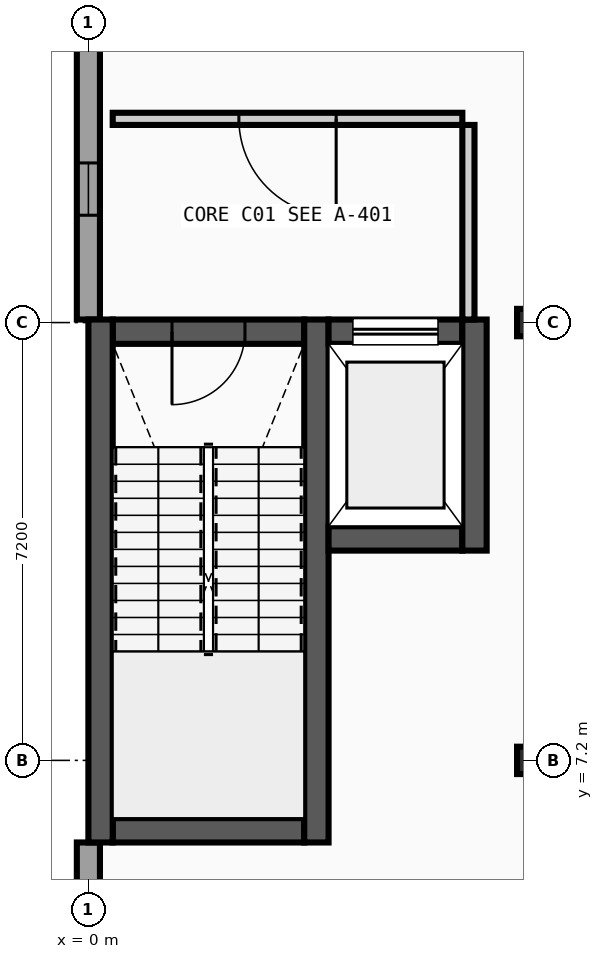
"""IFC4 building model, lengths in metres.
Left out: names, types, materials, properties, quantities, classifications, styles, units other than length and angle.
Written with IfcOpenShell. Run it as: python <this file> out.ifc"""

import sys

from ifc_helpers import new_model, si_unit, direction, frame, frame_2d, origin, origin_2d, place, context, subcontext, project, spatial, rectangle, i_section, extrude, element, fill, save


model = new_model("IFC4")
c1 = context("Model", 3, precision=1e-05, world=origin(), true_north=direction((0.0, 1.0)))
c2 = subcontext(c1, "Body", "Model", "MODEL_VIEW")
j1 = project(units=[si_unit("LENGTHUNIT", "METRE"), si_unit("PLANEANGLEUNIT", "RADIAN")], contexts=[c1])
p1 = place(None, origin())
s1 = spatial("IfcSite", under=j1, at=p1, CompositionType="ELEMENT")
p2 = place(p1, origin())
s2 = spatial("IfcBuilding", under=s1, at=p2, CompositionType="ELEMENT")
p3 = place(p2, frame((0.0, 0.0, 9.6)))
s3 = spatial("IfcBuildingStorey", under=s2, at=p3, CompositionType="ELEMENT", Elevation=9.6)
for number, where, z_axis, x_axis in (
    (1, (7.2, 7.2, 0.0), (0.0, 0.0, 1.0), (1.0, 0.0, 0.0)),
    (2, (7.2, 14.4, 0.0), (0.0, 0.0, 1.0), (1.0, 0.0, 0.0)),
):
    element("IfcColumn", number, at=place(p3, frame(where, z_axis=z_axis, x_axis=x_axis)), inside=s3, PredefinedType="COLUMN", context=c2, shape_type="SweptSolid", body=[
        extrude(i_section(OverallWidth=0.3, OverallDepth=0.45, WebThickness=0.014, FlangeThickness=0.026, FilletRadius=0.027, at=origin_2d()), origin(), (0.0, 0.0, 1.0), 4.4),
    ])
p4 = place(p3, frame((0.0, 5.85, 0.0), z_axis=(0.0, 0.0, 1.0), x_axis=(0.0, -1.0, 0.0)))
e3 = element("IfcWall", 3, at=p4, inside=s3, PredefinedType="STANDARD", context=c2, shape_type="SweptSolid", body=[
    extrude(rectangle(XDim=5.66, YDim=0.38, at=frame_2d((2.83, 0.0))), origin(), (0.0, 0.0, 1.0), 4.2),
])
p5 = place(p4, frame((2.196, 0.0, 0.95)))
e4 = element("IfcOpeningElement", 4, at=p5, cuts=e3, PredefinedType="OPENING", context=c2, shape_type="SweptSolid", body=[
    extrude(rectangle(XDim=1.268, YDim=1.296, at=frame_2d((0.634, 0.648))), frame((0.0, 0.2, 0.0), z_axis=(0.0, -1.0, 0.0), x_axis=(1.0, 0.0, 0.0)), (0.0, 0.0, 1.0), 0.4),
])
p6 = place(p3, frame((0.0, 21.6, 0.0), z_axis=(0.0, 0.0, 1.0), x_axis=(0.0, -1.0, 0.0)))
e5 = element("IfcWall", 5, at=p6, inside=s3, PredefinedType="STANDARD", context=c2, shape_type="SweptSolid", body=[
    extrude(rectangle(XDim=7.15, YDim=0.38, at=frame_2d((3.575, 0.0))), origin(), (0.0, 0.0, 1.0), 4.2),
])
p7 = place(p6, frame((1.715, 0.0, 0.95)))
e6 = element("IfcOpeningElement", 6, at=p7, cuts=e5, PredefinedType="OPENING", context=c2, shape_type="SweptSolid", body=[
    extrude(rectangle(XDim=0.86, YDim=1.332, at=frame_2d((0.43, 0.666))), frame((0.0, 0.2, 0.0), z_axis=(0.0, -1.0, 0.0), x_axis=(1.0, 0.0, 0.0)), (0.0, 0.0, 1.0), 0.4),
])
p8 = place(p6, frame((4.575, 0.0, 0.95)))
e7 = element("IfcOpeningElement", 7, at=p8, cuts=e5, PredefinedType="OPENING", context=c2, shape_type="SweptSolid", body=[
    extrude(rectangle(XDim=0.86, YDim=1.332, at=frame_2d((0.43, 0.666))), frame((0.0, 0.2, 0.0), z_axis=(0.0, -1.0, 0.0), x_axis=(1.0, 0.0, 0.0)), (0.0, 0.0, 1.0), 0.4),
])
p9 = place(p3, frame((0.4, 6.05, 0.0), z_axis=(0.0, 0.0, 1.0), x_axis=(1.0, 0.0, 0.0)))
e8 = element("IfcWall", 8, at=p9, inside=s3, PredefinedType="SHEAR", context=c2, shape_type="SweptSolid", body=[
    extrude(rectangle(XDim=3.15, YDim=0.4, at=frame_2d((1.575, 0.0))), origin(), (0.0, 0.0, 1.0), 4.2),
])
p10 = place(p3, frame((0.4, 14.25, 0.0), z_axis=(0.0, 0.0, 1.0), x_axis=(1.0, 0.0, 0.0)))
e9 = element("IfcWall", 9, at=p10, inside=s3, PredefinedType="SHEAR", context=c2, shape_type="SweptSolid", body=[
    extrude(rectangle(XDim=3.15, YDim=0.4, at=frame_2d((1.575, 0.0))), origin(), (0.0, 0.0, 1.0), 4.2),
])
p11 = place(p10, frame((0.975, 0.0, 0.0)))
e10 = element("IfcOpeningElement", 10, at=p11, cuts=e9, PredefinedType="OPENING", context=c2, shape_type="SweptSolid", body=[
    extrude(rectangle(XDim=1.2, YDim=2.15, at=frame_2d((0.6, 1.075))), frame((0.0, 0.21, 0.0), z_axis=(0.0, -1.0, 0.0), x_axis=(1.0, 0.0, 0.0)), (0.0, 0.0, 1.0), 0.42),
])
for number, where, z_axis, x_axis in (
    (11, (0.2, 5.85, 0.0), (0.0, 0.0, 1.0), (0.0, 1.0, 0.0)),
    (12, (3.75, 5.85, 0.0), (0.0, 0.0, 1.0), (0.0, 1.0, 0.0)),
):
    element("IfcWall", number, at=place(p3, frame(where, z_axis=z_axis, x_axis=x_axis)), inside=s3, PredefinedType="SHEAR", context=c2, shape_type="SweptSolid", body=[
        extrude(rectangle(XDim=8.6, YDim=0.4, at=frame_2d((4.3, 0.0))), origin(), (0.0, 0.0, 1.0), 4.2),
    ])
p12 = place(p3, frame((3.95, 10.85, 0.0), z_axis=(0.0, 0.0, 1.0), x_axis=(1.0, 0.0, 0.0)))
e13 = element("IfcWall", 13, at=p12, inside=s3, PredefinedType="SHEAR", context=c2, shape_type="SweptSolid", body=[
    extrude(rectangle(XDim=2.2, YDim=0.4, at=frame_2d((1.1, 0.0))), origin(), (0.0, 0.0, 1.0), 4.2),
])
p13 = place(p3, frame((3.95, 14.25, 0.0), z_axis=(0.0, 0.0, 1.0), x_axis=(1.0, 0.0, 0.0)))
e14 = element("IfcWall", 14, at=p13, inside=s3, PredefinedType="SHEAR", context=c2, shape_type="SweptSolid", body=[
    extrude(rectangle(XDim=2.2, YDim=0.4, at=frame_2d((1.1, 0.0))), origin(), (0.0, 0.0, 1.0), 4.2),
])
p14 = place(p13, frame((0.4, 0.0, 0.0)))
e15 = element("IfcOpeningElement", 15, at=p14, cuts=e14, PredefinedType="OPENING", context=c2, shape_type="SweptSolid", body=[
    extrude(rectangle(XDim=1.4, YDim=2.2, at=frame_2d((0.7, 1.1))), frame((0.0, 0.21, 0.0), z_axis=(0.0, -1.0, 0.0), x_axis=(1.0, 0.0, 0.0)), (0.0, 0.0, 1.0), 0.42),
])
p15 = place(p3, frame((6.35, 10.65, 0.0), z_axis=(0.0, 0.0, 1.0), x_axis=(0.0, 1.0, 0.0)))
e16 = element("IfcWall", 16, at=p15, inside=s3, PredefinedType="SHEAR", context=c2, shape_type="SweptSolid", body=[
    extrude(rectangle(XDim=3.8, YDim=0.4, at=frame_2d((1.9, 0.0))), origin(), (0.0, 0.0, 1.0), 4.2),
])
p16 = place(p3, frame((0.4, 17.75, 0.0), z_axis=(0.0, 0.0, 1.0), x_axis=(1.0, 0.0, 0.0)))
e17 = element("IfcWall", 17, at=p16, inside=s3, PredefinedType="PARTITIONING", context=c2, shape_type="SweptSolid", body=[
    extrude(rectangle(XDim=5.75, YDim=0.2, at=frame_2d((2.875, 0.0))), origin(), (0.0, 0.0, 1.0), 4.2),
])
p17 = place(p16, frame((2.075, 0.0, 0.0)))
e18 = element("IfcOpeningElement", 18, at=p17, cuts=e17, PredefinedType="OPENING", context=c2, shape_type="SweptSolid", body=[
    extrude(rectangle(XDim=1.6, YDim=2.2, at=frame_2d((0.8, 1.1))), frame((0.0, 0.11, 0.0), z_axis=(0.0, -1.0, 0.0), x_axis=(1.0, 0.0, 0.0)), (0.0, 0.0, 1.0), 0.22),
])
p18 = place(p3, frame((6.25, 14.45, 0.0), z_axis=(0.0, 0.0, 1.0), x_axis=(0.0, 1.0, 0.0)))
e19 = element("IfcWall", 19, at=p18, inside=s3, PredefinedType="PARTITIONING", context=c2, shape_type="SweptSolid", body=[
    extrude(rectangle(XDim=3.2, YDim=0.2, at=frame_2d((1.6, 0.0))), origin(), (0.0, 0.0, 1.0), 4.2),
])
p19 = place(p8, origin())
e20 = element("IfcWindow", 20, at=p19, inside=s3, PartitioningType="SINGLE_PANEL", PredefinedType="WINDOW", context=c2, shape_type="SweptSolid", body=[
    extrude(rectangle(XDim=0.86, YDim=1.332, at=frame_2d((0.43, 0.666))), frame((0.0, 0.03, 0.0), z_axis=(0.0, -1.0, 0.0), x_axis=(1.0, 0.0, 0.0)), (0.0, 0.0, 1.0), 0.06),
])
fill(e7, e20)
p20 = place(p11, frame((1.2, 0.0, 0.0), z_axis=(0.0, 0.0, 1.0), x_axis=(-1.0, 0.0, 0.0)))
e21 = element("IfcDoor", 21, at=p20, inside=s3, OperationType="SINGLE_SWING_LEFT", PredefinedType="DOOR", context=c2, shape_type="SweptSolid", body=[
    extrude(rectangle(XDim=1.2, YDim=2.15, at=frame_2d((0.6, 1.075))), frame((0.0, 0.025, 0.0), z_axis=(0.0, -1.0, 0.0), x_axis=(1.0, 0.0, 0.0)), (0.0, 0.0, 1.0), 0.05),
])
fill(e10, e21)
p21 = place(p14, origin())
e22 = element("IfcDoor", 22, at=p21, inside=s3, OperationType="SLIDING_TO_LEFT", PredefinedType="DOOR", context=c2, shape_type="SweptSolid", body=[
    extrude(rectangle(XDim=1.4, YDim=2.2, at=frame_2d((0.7, 1.1))), frame((0.0, 0.025, 0.0), z_axis=(0.0, -1.0, 0.0), x_axis=(1.0, 0.0, 0.0)), (0.0, 0.0, 1.0), 0.05),
])
fill(e15, e22)
p22 = place(p17, origin())
e23 = element("IfcDoor", 23, at=p22, inside=s3, OperationType="DOUBLE_DOOR_SINGLE_SWING", PredefinedType="DOOR", context=c2, shape_type="SweptSolid", body=[
    extrude(rectangle(XDim=1.6, YDim=2.2, at=frame_2d((0.8, 1.1))), frame((0.0, 0.025, 0.0), z_axis=(0.0, -1.0, 0.0), x_axis=(1.0, 0.0, 0.0)), (0.0, 0.0, 1.0), 0.05),
])
fill(e18, e23)
save(model, sys.argv[1])
